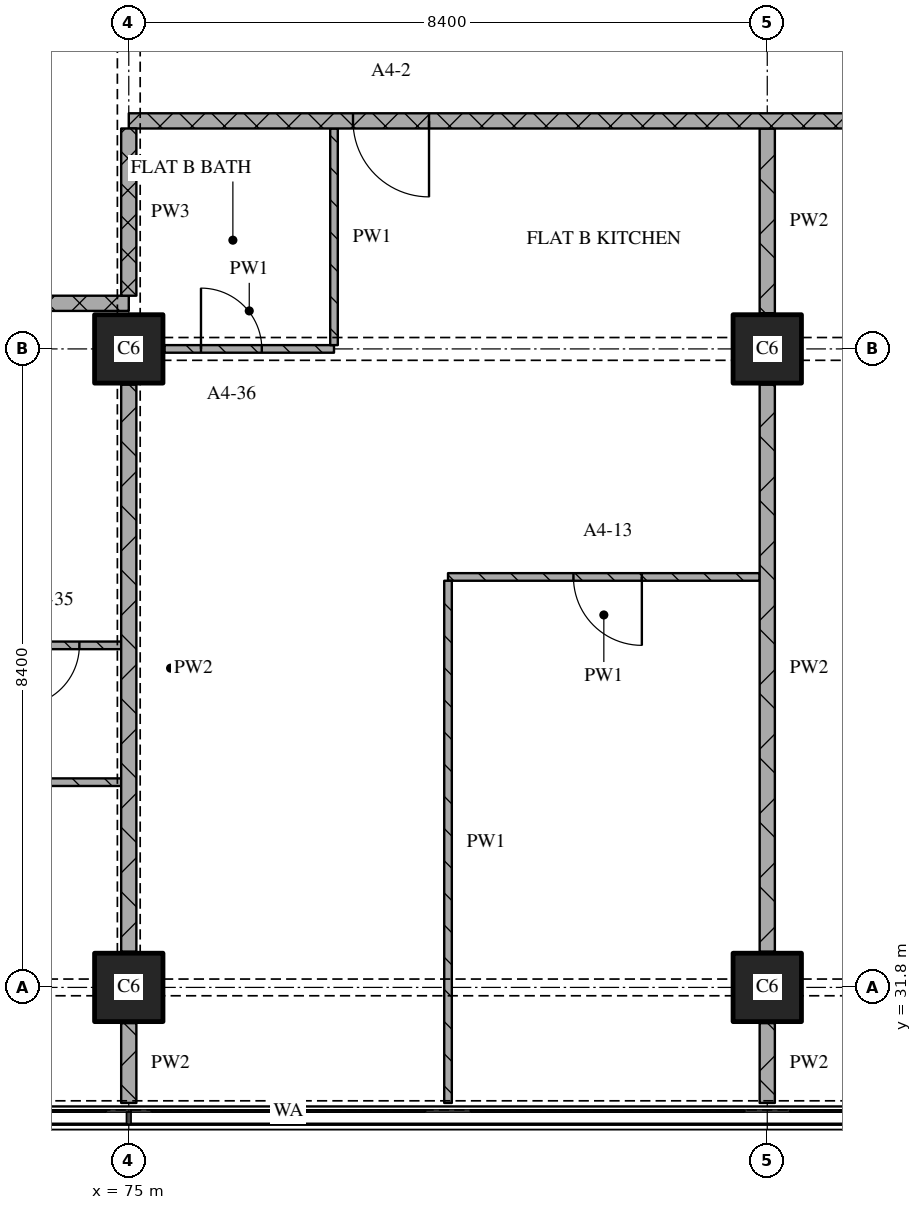
"""IFC4 building model, lengths in metres.
Left out: names, types, materials, properties, quantities, classifications, styles, units other than length and angle.
Written with IfcOpenShell. Run it as: python <this file> out.ifc"""

import sys

from ifc_helpers import new_model, si_unit, direction, frame, frame_2d, origin, origin_2d, place, context, subcontext, project, spatial, rectangle, extrude, element, fill, save


model = new_model("IFC4")
c1 = context("Model", 3, precision=1e-05, world=origin(), true_north=direction((0.0, 1.0)))
c2 = subcontext(c1, "Body", "Model", "MODEL_VIEW")
j1 = project(units=[si_unit("LENGTHUNIT", "METRE"), si_unit("PLANEANGLEUNIT", "RADIAN")], contexts=[c1])
p1 = place(None, origin())
s1 = spatial("IfcSite", under=j1, at=p1, CompositionType="ELEMENT")
p2 = place(p1, origin())
s2 = spatial("IfcBuilding", under=s1, at=p2, CompositionType="ELEMENT")
p3 = place(p2, frame((0.0, 0.0, 76.8)))
s3 = spatial("IfcBuildingStorey", under=s2, at=p3, CompositionType="ELEMENT", Elevation=76.8)
for number, where, z_axis, x_axis in (
    (1, (75.0, 31.8, 0.0), (0.0, 0.0, 1.0), (1.0, 0.0, 0.0)),
    (2, (75.0, 40.2, 0.0), (0.0, 0.0, 1.0), (1.0, 0.0, 0.0)),
    (3, (83.4, 31.8, 0.0), (0.0, 0.0, 1.0), (1.0, 0.0, 0.0)),
    (4, (83.4, 40.2, 0.0), (0.0, 0.0, 1.0), (1.0, 0.0, 0.0)),
):
    element("IfcColumn", number, at=place(p3, frame(where, z_axis=z_axis, x_axis=x_axis)), inside=s3, PredefinedType="COLUMN", context=c2, shape_type="SweptSolid", body=[
        extrude(rectangle(XDim=0.9, YDim=0.9, at=origin_2d()), origin(), (0.0, 0.0, 1.0), 3.6),
    ])
p4 = place(p3, frame((74.9, 34.5, 0.0), z_axis=(0.0, 0.0, 1.0), x_axis=(-1.0, 0.0, 0.0)))
e5 = element("IfcWall", 5, at=p4, inside=s3, PredefinedType="PARTITIONING", context=c2, shape_type="SweptSolid", body=[
    extrude(rectangle(XDim=16.7, YDim=0.1, at=frame_2d((8.35, 0.0))), origin(), (0.0, 0.0, 1.0), 3.32),
])
p5 = place(p4, frame((3.65, 0.0, 0.0)))
e6 = element("IfcOpeningElement", 6, at=p5, cuts=e5, PredefinedType="OPENING", context=c2, shape_type="SweptSolid", body=[
    extrude(rectangle(XDim=0.9, YDim=2.1, at=frame_2d((0.45, 1.05))), frame((0.0, 0.06, 0.0), z_axis=(0.0, -1.0, 0.0), x_axis=(1.0, 0.0, 0.0)), (0.0, 0.0, 1.0), 0.12),
])
p6 = place(p4, frame((12.05, 0.0, 0.0)))
e7 = element("IfcOpeningElement", 7, at=p6, cuts=e5, PredefinedType="OPENING", context=c2, shape_type="SweptSolid", body=[
    extrude(rectangle(XDim=0.9, YDim=2.1, at=frame_2d((0.45, 1.05))), frame((0.0, 0.06, 0.0), z_axis=(0.0, -1.0, 0.0), x_axis=(1.0, 0.0, 0.0)), (0.0, 0.0, 1.0), 0.12),
])
p7 = place(p3, frame((68.4, 36.3, 0.0), z_axis=(0.0, 0.0, 1.0), x_axis=(1.0, 0.0, 0.0)))
e8 = element("IfcWall", 8, at=p7, inside=s3, PredefinedType="PARTITIONING", context=c2, shape_type="SweptSolid", body=[
    extrude(rectangle(XDim=6.5, YDim=0.1, at=frame_2d((3.25, 0.0))), origin(), (0.0, 0.0, 1.0), 3.32),
])
p8 = place(p7, frame((5.15, 0.0, 0.0)))
e9 = element("IfcOpeningElement", 9, at=p8, cuts=e8, PredefinedType="OPENING", context=c2, shape_type="SweptSolid", body=[
    extrude(rectangle(XDim=0.8, YDim=2.1, at=frame_2d((0.4, 1.05))), frame((0.0, 0.06, 0.0), z_axis=(0.0, -1.0, 0.0), x_axis=(1.0, 0.0, 0.0)), (0.0, 0.0, 1.0), 0.12),
])
p9 = place(p3, frame((83.3, 37.2, 0.0), z_axis=(0.0, 0.0, 1.0), x_axis=(-1.0, 0.0, 0.0)))
e10 = element("IfcWall", 10, at=p9, inside=s3, PredefinedType="PARTITIONING", context=c2, shape_type="SweptSolid", body=[
    extrude(rectangle(XDim=4.1, YDim=0.1, at=frame_2d((2.05, 0.0))), origin(), (0.0, 0.0, 1.0), 3.32),
])
p10 = place(p9, frame((1.55, 0.0, 0.0)))
e11 = element("IfcOpeningElement", 11, at=p10, cuts=e10, PredefinedType="OPENING", context=c2, shape_type="SweptSolid", body=[
    extrude(rectangle(XDim=0.9, YDim=2.1, at=frame_2d((0.45, 1.05))), frame((0.0, 0.06, 0.0), z_axis=(0.0, -1.0, 0.0), x_axis=(1.0, 0.0, 0.0)), (0.0, 0.0, 1.0), 0.12),
])
p11 = place(p3, frame((75.47, 40.2, 0.0), z_axis=(0.0, 0.0, 1.0), x_axis=(1.0, 0.0, 0.0)))
e12 = element("IfcWall", 12, at=p11, inside=s3, PredefinedType="PARTITIONING", context=c2, shape_type="SweptSolid", body=[
    extrude(rectangle(XDim=2.23, YDim=0.1, at=frame_2d((1.115, 0.0))), origin(), (0.0, 0.0, 1.0), 2.83),
])
p12 = place(p11, frame((0.48, 0.0, 0.0)))
e13 = element("IfcOpeningElement", 13, at=p12, cuts=e12, PredefinedType="OPENING", context=c2, shape_type="SweptSolid", body=[
    extrude(rectangle(XDim=0.8, YDim=2.1, at=frame_2d((0.4, 1.05))), frame((0.0, 0.06, 0.0), z_axis=(0.0, -1.0, 0.0), x_axis=(1.0, 0.0, 0.0)), (0.0, 0.0, 1.0), 0.12),
])
p13 = place(p3, frame((75.0, 40.8, 0.0), z_axis=(0.0, 0.0, 1.0), x_axis=(-1.0, 0.0, 0.0)))
e14 = element("IfcWall", 14, at=p13, inside=s3, PredefinedType="PARTITIONING", context=c2, shape_type="SweptSolid", body=[
    extrude(rectangle(XDim=24.08, YDim=0.2, at=frame_2d((12.04, 0.0))), origin(), (0.0, 0.0, 1.0), 3.32),
])
p14 = place(p13, frame((6.85, 0.0, 0.0)))
e15 = element("IfcOpeningElement", 15, at=p14, cuts=e14, PredefinedType="OPENING", context=c2, shape_type="SweptSolid", body=[
    extrude(rectangle(XDim=1.0, YDim=2.1, at=frame_2d((0.5, 1.05))), frame((0.0, 0.11, 0.0), z_axis=(0.0, -1.0, 0.0), x_axis=(1.0, 0.0, 0.0)), (0.0, 0.0, 1.0), 0.22),
])
p15 = place(p3, frame((100.2, 43.2, 0.0), z_axis=(0.0, 0.0, 1.0), x_axis=(-1.0, 0.0, 0.0)))
e16 = element("IfcWall", 16, at=p15, inside=s3, PredefinedType="PARTITIONING", context=c2, shape_type="SweptSolid", body=[
    extrude(rectangle(XDim=25.2, YDim=0.2, at=frame_2d((12.6, 0.0))), origin(), (0.0, 0.0, 1.0), 3.32),
])
p16 = place(p15, frame((5.95, 0.0, 0.0)))
e17 = element("IfcOpeningElement", 17, at=p16, cuts=e16, PredefinedType="OPENING", context=c2, shape_type="SweptSolid", body=[
    extrude(rectangle(XDim=1.0, YDim=2.1, at=frame_2d((0.5, 1.05))), frame((0.0, 0.11, 0.0), z_axis=(0.0, -1.0, 0.0), x_axis=(1.0, 0.0, 0.0)), (0.0, 0.0, 1.0), 0.22),
])
p17 = place(p15, frame((21.25, 0.0, 0.0)))
e18 = element("IfcOpeningElement", 18, at=p17, cuts=e16, PredefinedType="OPENING", context=c2, shape_type="SweptSolid", body=[
    extrude(rectangle(XDim=1.0, YDim=2.1, at=frame_2d((0.5, 1.05))), frame((0.0, 0.11, 0.0), z_axis=(0.0, -1.0, 0.0), x_axis=(1.0, 0.0, 0.0)), (0.0, 0.0, 1.0), 0.22),
])
p18 = place(p3, frame((75.0, 43.1, 0.0), z_axis=(0.0, 0.0, 1.0), x_axis=(0.0, -1.0, 0.0)))
e19 = element("IfcWall", 19, at=p18, inside=s3, PredefinedType="PARTITIONING", context=c2, shape_type="SweptSolid", body=[
    extrude(rectangle(XDim=2.2, YDim=0.2, at=frame_2d((1.1, 0.0))), origin(), (0.0, 0.0, 1.0), 2.43),
])
p19 = place(p3, frame((75.0, 31.33, 0.0), z_axis=(0.0, 0.0, 1.0), x_axis=(0.0, -1.0, 0.0)))
e20 = element("IfcWall", 20, at=p19, inside=s3, PredefinedType="PARTITIONING", context=c2, shape_type="SweptSolid", body=[
    extrude(rectangle(XDim=1.05, YDim=0.2, at=frame_2d((0.525, 0.0))), origin(), (0.0, 0.0, 1.0), 3.32),
])
p20 = place(p3, frame((75.0, 39.73, 0.0), z_axis=(0.0, 0.0, 1.0), x_axis=(0.0, -1.0, 0.0)))
e21 = element("IfcWall", 21, at=p20, inside=s3, PredefinedType="PARTITIONING", context=c2, shape_type="SweptSolid", body=[
    extrude(rectangle(XDim=7.46, YDim=0.2, at=frame_2d((3.73, 0.0))), origin(), (0.0, 0.0, 1.0), 2.83),
])
p21 = place(p3, frame((77.7, 43.1, 0.0), z_axis=(0.0, 0.0, 1.0), x_axis=(0.0, -1.0, 0.0)))
e22 = element("IfcWall", 22, at=p21, inside=s3, PredefinedType="PARTITIONING", context=c2, shape_type="SweptSolid", body=[
    extrude(rectangle(XDim=2.85, YDim=0.1, at=frame_2d((1.425, 0.0))), origin(), (0.0, 0.0, 1.0), 3.32),
])
p22 = place(p3, frame((79.2, 37.15, 0.0), z_axis=(0.0, 0.0, 1.0), x_axis=(0.0, -1.0, 0.0)))
e23 = element("IfcWall", 23, at=p22, inside=s3, PredefinedType="PARTITIONING", context=c2, shape_type="SweptSolid", body=[
    extrude(rectangle(XDim=6.87, YDim=0.1, at=frame_2d((3.435, 0.0))), origin(), (0.0, 0.0, 1.0), 3.32),
])
p23 = place(p3, frame((83.4, 31.33, 0.0), z_axis=(0.0, 0.0, 1.0), x_axis=(0.0, -1.0, 0.0)))
e24 = element("IfcWall", 24, at=p23, inside=s3, PredefinedType="PARTITIONING", context=c2, shape_type="SweptSolid", body=[
    extrude(rectangle(XDim=1.05, YDim=0.2, at=frame_2d((0.525, 0.0))), origin(), (0.0, 0.0, 1.0), 3.32),
])
p24 = place(p3, frame((83.4, 39.73, 0.0), z_axis=(0.0, 0.0, 1.0), x_axis=(0.0, -1.0, 0.0)))
e25 = element("IfcWall", 25, at=p24, inside=s3, PredefinedType="PARTITIONING", context=c2, shape_type="SweptSolid", body=[
    extrude(rectangle(XDim=7.46, YDim=0.2, at=frame_2d((3.73, 0.0))), origin(), (0.0, 0.0, 1.0), 3.32),
])
p25 = place(p3, frame((83.4, 43.1, 0.0), z_axis=(0.0, 0.0, 1.0), x_axis=(0.0, -1.0, 0.0)))
e26 = element("IfcWall", 26, at=p25, inside=s3, PredefinedType="PARTITIONING", context=c2, shape_type="SweptSolid", body=[
    extrude(rectangle(XDim=2.43, YDim=0.2, at=frame_2d((1.215, 0.0))), origin(), (0.0, 0.0, 1.0), 3.32),
])
p26 = place(p8, origin())
e27 = element("IfcDoor", 27, at=p26, inside=s3, OperationType="SINGLE_SWING_RIGHT", PredefinedType="DOOR", context=c2, shape_type="SweptSolid", body=[
    extrude(rectangle(XDim=0.8, YDim=2.1, at=frame_2d((0.4, 1.05))), frame((0.0, 0.025, 0.0), z_axis=(0.0, -1.0, 0.0), x_axis=(1.0, 0.0, 0.0)), (0.0, 0.0, 1.0), 0.05),
])
fill(e9, e27)
p27 = place(p10, origin())
e28 = element("IfcDoor", 28, at=p27, inside=s3, OperationType="SINGLE_SWING_LEFT", PredefinedType="DOOR", context=c2, shape_type="SweptSolid", body=[
    extrude(rectangle(XDim=0.9, YDim=2.1, at=frame_2d((0.45, 1.05))), frame((0.0, 0.025, 0.0), z_axis=(0.0, -1.0, 0.0), x_axis=(1.0, 0.0, 0.0)), (0.0, 0.0, 1.0), 0.05),
])
fill(e11, e28)
p28 = place(p12, origin())
e29 = element("IfcDoor", 29, at=p28, inside=s3, OperationType="SINGLE_SWING_LEFT", PredefinedType="DOOR", context=c2, shape_type="SweptSolid", body=[
    extrude(rectangle(XDim=0.8, YDim=2.1, at=frame_2d((0.4, 1.05))), frame((0.0, 0.025, 0.0), z_axis=(0.0, -1.0, 0.0), x_axis=(1.0, 0.0, 0.0)), (0.0, 0.0, 1.0), 0.05),
])
fill(e13, e29)
p29 = place(p17, origin())
e30 = element("IfcDoor", 30, at=p29, inside=s3, OperationType="SINGLE_SWING_LEFT", PredefinedType="DOOR", context=c2, shape_type="SweptSolid", body=[
    extrude(rectangle(XDim=1.0, YDim=2.1, at=frame_2d((0.5, 1.05))), frame((0.0, 0.025, 0.0), z_axis=(0.0, -1.0, 0.0), x_axis=(1.0, 0.0, 0.0)), (0.0, 0.0, 1.0), 0.05),
])
fill(e18, e30)
save(model, sys.argv[1])
